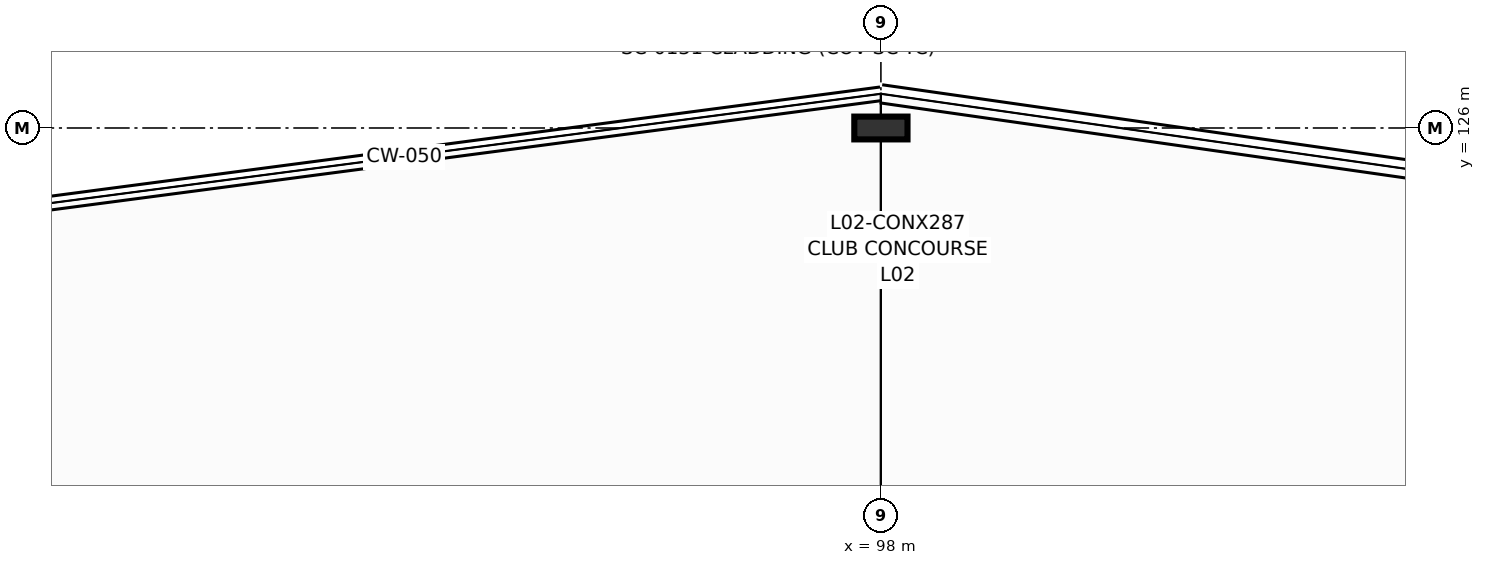
"""IFC4 building model, lengths in metres.
Left out: names, types, materials, properties, quantities, classifications, styles, units other than length and angle.
Written with IfcOpenShell. Run it as: python <this file> out.ifc"""

import sys

from ifc_helpers import new_model, si_unit, direction, frame, origin, origin_2d, place, context, subcontext, project, spatial, i_section, extrude, element, save


model = new_model("IFC4")
c1 = context("Model", 3, precision=1e-05, world=origin(), true_north=direction((0.0, 1.0)))
c2 = subcontext(c1, "Body", "Model", "MODEL_VIEW")
j1 = project(units=[si_unit("LENGTHUNIT", "METRE"), si_unit("PLANEANGLEUNIT", "RADIAN")], contexts=[c1])
p1 = place(None, origin())
s1 = spatial("IfcSite", under=j1, at=p1, CompositionType="ELEMENT")
p2 = place(p1, origin())
s2 = spatial("IfcBuilding", under=s1, at=p2, CompositionType="ELEMENT")
p3 = place(p2, frame((0.0, 0.0, 9.0)))
s3 = spatial("IfcBuildingStorey", under=s2, at=p3, CompositionType="ELEMENT", Elevation=9.0)
p4 = place(p3, frame((98.0, 126.0, 0.0), z_axis=(0.0, 0.0, 1.0), x_axis=(0.0, 1.0, 0.0)))
e1 = element("IfcColumn", 1, at=p4, inside=s3, PredefinedType="COLUMN", context=c2, shape_type="SweptSolid", body=[
    extrude(i_section(OverallWidth=0.3, OverallDepth=0.7, WebThickness=0.017, FlangeThickness=0.032, at=origin_2d()), origin(), (0.0, 0.0, 1.0), 4.5),
])
save(model, sys.argv[1])
